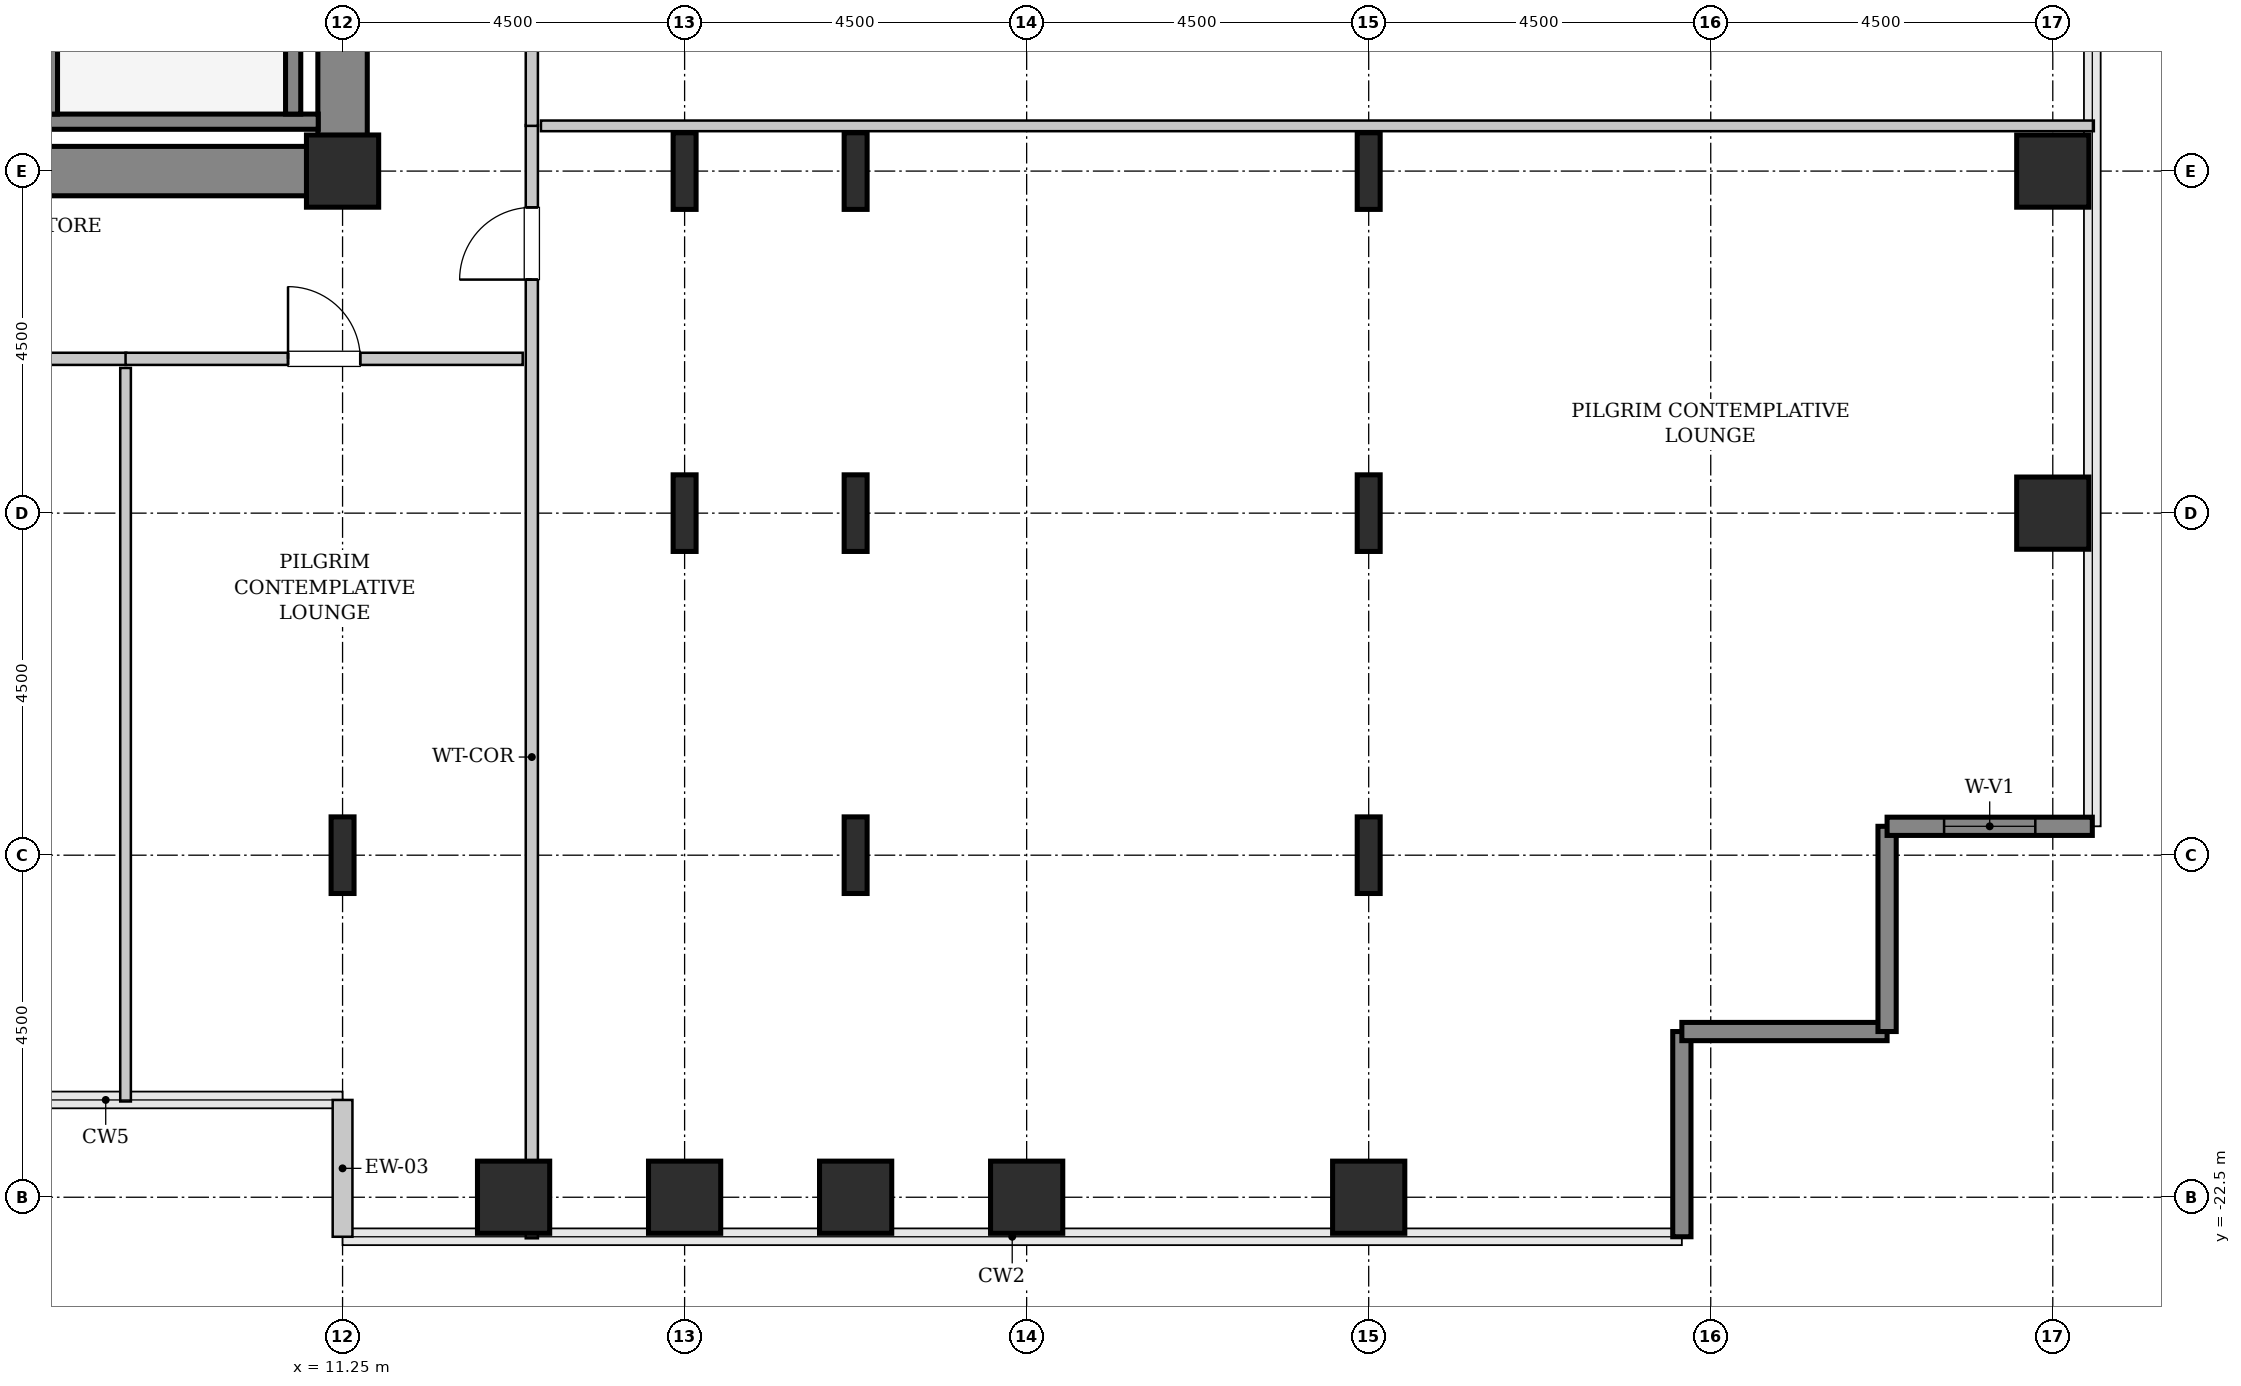
"""IFC4 building model, lengths in metres.
Left out: names, types, materials, properties, quantities, classifications, styles, units other than length and angle.
Written with IfcOpenShell. Run it as: python <this file> out.ifc"""

import sys

from ifc_helpers import new_model, si_unit, direction, frame, frame_2d, origin, origin_2d, place, context, subcontext, project, spatial, rectangle, hollow_rectangle, i_section, extrude, source, transform, mapped, element, fill, save


model = new_model("IFC4")
c1 = context("Model", 3, precision=1e-05, world=origin(), true_north=direction((0.0, 1.0)))
c2 = subcontext(c1, "Body", "Model", "MODEL_VIEW")
j1 = project(units=[si_unit("LENGTHUNIT", "METRE"), si_unit("PLANEANGLEUNIT", "RADIAN")], contexts=[c1])
p1 = place(None, origin())
s1 = spatial("IfcSite", under=j1, at=p1, CompositionType="ELEMENT")
p2 = place(p1, origin())
s2 = spatial("IfcBuilding", under=s1, at=p2, CompositionType="ELEMENT")
p3 = place(p2, frame((0.0, 0.0, 40.6)))
s3 = spatial("IfcBuildingStorey", under=s2, at=p3, CompositionType="ELEMENT", Elevation=40.6)
m1 = source(origin(), c2, "Body", "SweptSolid", [
    extrude(rectangle(XDim=10.025, YDim=0.65, at=frame_2d((5.012, 0.0))), origin(), (0.0, 0.0, 1.0), 3.8),
])
p4 = place(p3, frame((1.55, -9.0, 0.0), z_axis=(0.0, 0.0, 1.0), x_axis=(1.0, 0.0, 0.0)))
e1 = element("IfcWall", 1, at=p4, inside=s3, PredefinedType="SHEAR", context=c2, shape_type="MappedRepresentation", body=[
    mapped(m1, transform((0.0, 0.0, 0.0), x_axis=(1.0, 0.0, 0.0), y_axis=(0.0, 1.0, 0.0), z_axis=(0.0, 0.0, 1.0), scale=1.0)),
])
m2 = source(origin(), c2, "Body", "SweptSolid", [
    extrude(rectangle(XDim=7.325, YDim=0.65, at=frame_2d((3.663, 0.0))), origin(), (0.0, 0.0, 1.0), 3.8),
])
p5 = place(p3, frame((11.25, -8.675, 0.0), z_axis=(0.0, 0.0, 1.0), x_axis=(0.0, 1.0, 0.0)))
e2 = element("IfcWall", 2, at=p5, inside=s3, PredefinedType="SHEAR", context=c2, shape_type="MappedRepresentation", body=[
    mapped(m2, transform((0.0, 0.0, 0.0), x_axis=(1.0, 0.0, 0.0), y_axis=(0.0, 1.0, 0.0), z_axis=(0.0, 0.0, 1.0), scale=1.0)),
])
m3 = source(origin(), c2, "Body", "SweptSolid", [
    extrude(i_section(OverallWidth=0.302, OverallDepth=1.008, WebThickness=0.021, FlangeThickness=0.04, FilletRadius=0.03, at=origin_2d()), origin(), (0.0, 0.0, 1.0), 3.8),
])
p6 = place(p3, frame((11.25, -18.0, 0.0), z_axis=(0.0, 0.0, 1.0), x_axis=(1.0, 0.0, 0.0)))
e3 = element("IfcColumn", 3, at=p6, inside=s3, PredefinedType="COLUMN", context=c2, shape_type="MappedRepresentation", body=[
    mapped(m3, transform((0.0, 0.0, 0.0), x_axis=(1.0, 0.0, 0.0), y_axis=(0.0, 1.0, 0.0), z_axis=(0.0, 0.0, 1.0), scale=1.0)),
])
m4 = source(origin(), c2, "Body", "SweptSolid", [
    extrude(hollow_rectangle(XDim=0.95, YDim=0.95, WallThickness=0.045, InnerFilletRadius=0.045, OuterFilletRadius=0.09, at=origin_2d()), origin(), (0.0, 0.0, 1.0), 3.8),
])
p7 = place(p3, frame((11.25, -9.0, 0.0), z_axis=(0.0, 0.0, 1.0), x_axis=(1.0, 0.0, 0.0)))
e4 = element("IfcColumn", 4, at=p7, inside=s3, PredefinedType="COLUMN", context=c2, shape_type="MappedRepresentation", body=[
    mapped(m4, transform((0.0, 0.0, 0.0), x_axis=(1.0, 0.0, 0.0), y_axis=(0.0, 1.0, 0.0), z_axis=(0.0, 0.0, 1.0), scale=1.0)),
])
m5 = source(origin(), c2, "Body", "SweptSolid", [
    extrude(hollow_rectangle(XDim=0.95, YDim=0.95, WallThickness=0.045, InnerFilletRadius=0.045, OuterFilletRadius=0.09, at=origin_2d()), origin(), (0.0, 0.0, 1.0), 3.8),
])
for number, where, z_axis, x_axis in (
    (5, (13.5, -22.5, 0.0), (0.0, 0.0, 1.0), (1.0, 0.0, 0.0)),
    (6, (15.75, -22.5, 0.0), (0.0, 0.0, 1.0), (1.0, 0.0, 0.0)),
):
    element("IfcColumn", number, at=place(p3, frame(where, z_axis=z_axis, x_axis=x_axis)), inside=s3, PredefinedType="COLUMN", context=c2, shape_type="MappedRepresentation", body=[
        mapped(m5, transform((0.0, 0.0, 0.0), x_axis=(1.0, 0.0, 0.0), y_axis=(0.0, 1.0, 0.0), z_axis=(0.0, 0.0, 1.0), scale=1.0)),
    ])
for number, where, z_axis, x_axis in (
    (7, (15.75, -13.5, 0.0), (0.0, 0.0, 1.0), (1.0, 0.0, 0.0)),
    (8, (15.75, -9.0, 0.0), (0.0, 0.0, 1.0), (1.0, 0.0, 0.0)),
):
    element("IfcColumn", number, at=place(p3, frame(where, z_axis=z_axis, x_axis=x_axis)), inside=s3, PredefinedType="COLUMN", context=c2, shape_type="MappedRepresentation", body=[
        mapped(m3, transform((0.0, 0.0, 0.0), x_axis=(1.0, 0.0, 0.0), y_axis=(0.0, 1.0, 0.0), z_axis=(0.0, 0.0, 1.0), scale=1.0)),
    ])
p8 = place(p3, frame((18.0, -22.5, 0.0), z_axis=(0.0, 0.0, 1.0), x_axis=(1.0, 0.0, 0.0)))
e9 = element("IfcColumn", 9, at=p8, inside=s3, PredefinedType="COLUMN", context=c2, shape_type="MappedRepresentation", body=[
    mapped(m5, transform((0.0, 0.0, 0.0), x_axis=(1.0, 0.0, 0.0), y_axis=(0.0, 1.0, 0.0), z_axis=(0.0, 0.0, 1.0), scale=1.0)),
])
for number, where, z_axis, x_axis in (
    (10, (18.0, -18.0, 0.0), (0.0, 0.0, 1.0), (1.0, 0.0, 0.0)),
    (11, (18.0, -13.5, 0.0), (0.0, 0.0, 1.0), (1.0, 0.0, 0.0)),
    (12, (18.0, -9.0, 0.0), (0.0, 0.0, 1.0), (1.0, 0.0, 0.0)),
):
    element("IfcColumn", number, at=place(p3, frame(where, z_axis=z_axis, x_axis=x_axis)), inside=s3, PredefinedType="COLUMN", context=c2, shape_type="MappedRepresentation", body=[
        mapped(m3, transform((0.0, 0.0, 0.0), x_axis=(1.0, 0.0, 0.0), y_axis=(0.0, 1.0, 0.0), z_axis=(0.0, 0.0, 1.0), scale=1.0)),
    ])
for number, where, z_axis, x_axis in (
    (13, (20.25, -22.5, 0.0), (0.0, 0.0, 1.0), (1.0, 0.0, 0.0)),
    (14, (24.75, -22.5, 0.0), (0.0, 0.0, 1.0), (1.0, 0.0, 0.0)),
):
    element("IfcColumn", number, at=place(p3, frame(where, z_axis=z_axis, x_axis=x_axis)), inside=s3, PredefinedType="COLUMN", context=c2, shape_type="MappedRepresentation", body=[
        mapped(m5, transform((0.0, 0.0, 0.0), x_axis=(1.0, 0.0, 0.0), y_axis=(0.0, 1.0, 0.0), z_axis=(0.0, 0.0, 1.0), scale=1.0)),
    ])
for number, where, z_axis, x_axis in (
    (15, (24.75, -18.0, 0.0), (0.0, 0.0, 1.0), (1.0, 0.0, 0.0)),
    (16, (24.75, -13.5, 0.0), (0.0, 0.0, 1.0), (1.0, 0.0, 0.0)),
    (17, (24.75, -9.0, 0.0), (0.0, 0.0, 1.0), (1.0, 0.0, 0.0)),
):
    element("IfcColumn", number, at=place(p3, frame(where, z_axis=z_axis, x_axis=x_axis)), inside=s3, PredefinedType="COLUMN", context=c2, shape_type="MappedRepresentation", body=[
        mapped(m3, transform((0.0, 0.0, 0.0), x_axis=(1.0, 0.0, 0.0), y_axis=(0.0, 1.0, 0.0), z_axis=(0.0, 0.0, 1.0), scale=1.0)),
    ])
for number, where, z_axis, x_axis in (
    (18, (33.75, -13.5, 0.0), (0.0, 0.0, 1.0), (1.0, 0.0, 0.0)),
    (19, (33.75, -9.0, 0.0), (0.0, 0.0, 1.0), (1.0, 0.0, 0.0)),
):
    element("IfcColumn", number, at=place(p3, frame(where, z_axis=z_axis, x_axis=x_axis)), inside=s3, PredefinedType="COLUMN", context=c2, shape_type="MappedRepresentation", body=[
        mapped(m5, transform((0.0, 0.0, 0.0), x_axis=(1.0, 0.0, 0.0), y_axis=(0.0, 1.0, 0.0), z_axis=(0.0, 0.0, 1.0), scale=1.0)),
    ])
m6 = source(origin(), c2, "Body", "SweptSolid", [
    extrude(rectangle(XDim=1.8, YDim=0.26, at=frame_2d((0.9, 0.0))), origin(), (0.0, 0.0, 1.0), 3.55),
])
p9 = place(p3, frame((11.25, -21.22, 0.0), z_axis=(0.0, 0.0, 1.0), x_axis=(0.0, -1.0, 0.0)))
e20 = element("IfcWall", 20, at=p9, inside=s3, PredefinedType="SOLIDWALL", context=c2, shape_type="MappedRepresentation", body=[
    mapped(m6, transform((0.0, 0.0, 0.0), x_axis=(1.0, 0.0, 0.0), y_axis=(0.0, 1.0, 0.0), z_axis=(0.0, 0.0, 1.0), scale=1.0)),
])
m7 = source(origin(), c2, "Body", "SweptSolid", [
    extrude(rectangle(XDim=2.7, YDim=0.24, at=frame_2d((1.35, 0.0))), origin(), (0.0, 0.0, 1.0), 3.55),
])
for number, where, z_axis, x_axis in (
    (21, (28.87, -23.02, 0.0), (0.0, 0.0, 1.0), (0.0, 1.0, 0.0)),
    (22, (28.87, -20.32, 0.0), (0.0, 0.0, 1.0), (1.0, 0.0, 0.0)),
    (23, (31.57, -20.32, 0.0), (0.0, 0.0, 1.0), (0.0, 1.0, 0.0)),
):
    element("IfcWall", number, at=place(p3, frame(where, z_axis=z_axis, x_axis=x_axis)), inside=s3, PredefinedType="SHEAR", context=c2, shape_type="MappedRepresentation", body=[
        mapped(m7, transform((0.0, 0.0, 0.0), x_axis=(1.0, 0.0, 0.0), y_axis=(0.0, 1.0, 0.0), z_axis=(0.0, 0.0, 1.0), scale=1.0)),
    ])
p10 = place(p3, frame((31.57, -17.62, 0.0), z_axis=(0.0, 0.0, 1.0), x_axis=(1.0, 0.0, 0.0)))
e24 = element("IfcWall", 24, at=p10, inside=s3, PredefinedType="SHEAR", context=c2, shape_type="MappedRepresentation", body=[
    mapped(m7, transform((0.0, 0.0, 0.0), x_axis=(1.0, 0.0, 0.0), y_axis=(0.0, 1.0, 0.0), z_axis=(0.0, 0.0, 1.0), scale=1.0)),
])
p11 = place(p10, frame((0.75, 0.0, 0.85)))
e25 = element("IfcOpeningElement", 25, at=p11, cuts=e24, PredefinedType="OPENING", context=c2, shape_type="SweptSolid", body=[
    extrude(rectangle(XDim=1.2, YDim=1.8, at=frame_2d((0.6, 0.9))), frame((0.0, 0.13, 0.0), z_axis=(0.0, -1.0, 0.0), x_axis=(1.0, 0.0, 0.0)), (0.0, 0.0, 1.0), 0.26),
])
m8 = source(origin(), c2, "Body", "SweptSolid", [
    extrude(rectangle(XDim=3.63, YDim=0.2, at=frame_2d((1.815, 0.0))), origin(), (0.0, 0.0, 1.0), 3.8),
])
p12 = place(p3, frame((7.3, -8.35, 0.0), z_axis=(0.0, 0.0, 1.0), x_axis=(1.0, 0.0, 0.0)))
e26 = element("IfcWall", 26, at=p12, inside=s3, PredefinedType="SOLIDWALL", context=c2, shape_type="MappedRepresentation", body=[
    mapped(m8, transform((0.0, 0.0, 0.0), x_axis=(1.0, 0.0, 0.0), y_axis=(0.0, 1.0, 0.0), z_axis=(0.0, 0.0, 1.0), scale=1.0)),
])
m9 = source(origin(), c2, "Body", "SweptSolid", [
    extrude(rectangle(XDim=7.1, YDim=0.2, at=frame_2d((3.55, 0.0))), origin(), (0.0, 0.0, 1.0), 3.8),
])
p13 = place(p3, frame((7.4, -1.15, 0.0), z_axis=(0.0, 0.0, 1.0), x_axis=(0.0, -1.0, 0.0)))
e27 = element("IfcWall", 27, at=p13, inside=s3, PredefinedType="SOLIDWALL", context=c2, shape_type="MappedRepresentation", body=[
    mapped(m9, transform((0.0, 0.0, 0.0), x_axis=(1.0, 0.0, 0.0), y_axis=(0.0, 1.0, 0.0), z_axis=(0.0, 0.0, 1.0), scale=1.0)),
])
p14 = place(p13, frame((0.18, 0.0, 0.0)))
e28 = element("IfcOpeningElement", 28, at=p14, cuts=e27, PredefinedType="OPENING", context=c2, shape_type="SweptSolid", body=[
    extrude(rectangle(XDim=1.1, YDim=2.15, at=frame_2d((0.55, 1.075))), frame((0.0, 0.11, 0.0), z_axis=(0.0, -1.0, 0.0), x_axis=(1.0, 0.0, 0.0)), (0.0, 0.0, 1.0), 0.22),
])
p15 = place(p3, frame((10.6, -1.15, 0.0), z_axis=(0.0, 0.0, 1.0), x_axis=(0.0, -1.0, 0.0)))
e29 = element("IfcWall", 29, at=p15, inside=s3, PredefinedType="SOLIDWALL", context=c2, shape_type="MappedRepresentation", body=[
    mapped(m9, transform((0.0, 0.0, 0.0), x_axis=(1.0, 0.0, 0.0), y_axis=(0.0, 1.0, 0.0), z_axis=(0.0, 0.0, 1.0), scale=1.0)),
])
m10 = source(origin(), c2, "Body", "SweptSolid", [
    extrude(rectangle(XDim=14.645, YDim=0.16, at=frame_2d((7.323, 0.0))), origin(), (0.0, 0.0, 1.0), 3.535),
])
p16 = place(p3, frame((13.74, -23.04, 0.0), z_axis=(0.0, 0.0, 1.0), x_axis=(0.0, 1.0, 0.0)))
e30 = element("IfcWall", 30, at=p16, inside=s3, PredefinedType="PARTITIONING", context=c2, shape_type="MappedRepresentation", body=[
    mapped(m10, transform((0.0, 0.0, 0.0), x_axis=(1.0, 0.0, 0.0), y_axis=(0.0, 1.0, 0.0), z_axis=(0.0, 0.0, 1.0), scale=1.0)),
])
p17 = place(p16, frame((12.613, 0.0, 0.0)))
e31 = element("IfcOpeningElement", 31, at=p17, cuts=e30, PredefinedType="OPENING", context=c2, shape_type="SweptSolid", body=[
    extrude(rectangle(XDim=0.95, YDim=2.1, at=frame_2d((0.475, 1.05))), frame((0.0, 0.09, 0.0), z_axis=(0.0, -1.0, 0.0), x_axis=(1.0, 0.0, 0.0)), (0.0, 0.0, 1.0), 0.18),
])
m11 = source(origin(), c2, "Body", "SweptSolid", [
    extrude(rectangle(XDim=20.43, YDim=0.14, at=frame_2d((10.215, 0.0))), origin(), (0.0, 0.0, 1.0), 3.535),
])
p18 = place(p3, frame((13.86, -8.405, 0.0), z_axis=(0.0, 0.0, 1.0), x_axis=(1.0, 0.0, 0.0)))
e32 = element("IfcWall", 32, at=p18, inside=s3, PredefinedType="PARTITIONING", context=c2, shape_type="MappedRepresentation", body=[
    mapped(m11, transform((0.0, 0.0, 0.0), x_axis=(1.0, 0.0, 0.0), y_axis=(0.0, 1.0, 0.0), z_axis=(0.0, 0.0, 1.0), scale=1.0)),
])
m12 = source(origin(), c2, "Body", "SweptSolid", [
    extrude(rectangle(XDim=3.61, YDim=0.16, at=frame_2d((1.805, 0.0))), origin(), (0.0, 0.0, 1.0), 3.535),
])
p19 = place(p3, frame((13.74, -8.405, 0.0), z_axis=(0.0, 0.0, 1.0), x_axis=(0.0, 1.0, 0.0)))
e33 = element("IfcWall", 33, at=p19, inside=s3, PredefinedType="PARTITIONING", context=c2, shape_type="MappedRepresentation", body=[
    mapped(m12, transform((0.0, 0.0, 0.0), x_axis=(1.0, 0.0, 0.0), y_axis=(0.0, 1.0, 0.0), z_axis=(0.0, 0.0, 1.0), scale=1.0)),
])
p20 = place(p19, frame((1.33, 0.0, 0.0)))
e34 = element("IfcOpeningElement", 34, at=p20, cuts=e33, PredefinedType="OPENING", context=c2, shape_type="SweptSolid", body=[
    extrude(rectangle(XDim=0.95, YDim=2.1, at=frame_2d((0.475, 1.05))), frame((0.0, 0.09, 0.0), z_axis=(0.0, -1.0, 0.0), x_axis=(1.0, 0.0, 0.0)), (0.0, 0.0, 1.0), 0.18),
])
m13 = source(origin(), c2, "Body", "SweptSolid", [
    extrude(rectangle(XDim=5.81, YDim=0.16, at=frame_2d((2.905, 0.0))), origin(), (0.0, 0.0, 1.0), 3.535),
])
p21 = place(p3, frame((2.595, -11.47, 0.0), z_axis=(0.0, 0.0, 1.0), x_axis=(1.0, 0.0, 0.0)))
e35 = element("IfcWall", 35, at=p21, inside=s3, PredefinedType="PARTITIONING", context=c2, shape_type="MappedRepresentation", body=[
    mapped(m13, transform((0.0, 0.0, 0.0), x_axis=(1.0, 0.0, 0.0), y_axis=(0.0, 1.0, 0.0), z_axis=(0.0, 0.0, 1.0), scale=1.0)),
])
p22 = place(p21, frame((2.43, 0.0, 0.0)))
e36 = element("IfcOpeningElement", 36, at=p22, cuts=e35, PredefinedType="OPENING", context=c2, shape_type="SweptSolid", body=[
    extrude(rectangle(XDim=0.95, YDim=2.1, at=frame_2d((0.475, 1.05))), frame((0.0, 0.09, 0.0), z_axis=(0.0, -1.0, 0.0), x_axis=(1.0, 0.0, 0.0)), (0.0, 0.0, 1.0), 0.18),
])
m14 = source(origin(), c2, "Body", "SweptSolid", [
    extrude(rectangle(XDim=9.65, YDim=0.14, at=frame_2d((4.825, 0.0))), origin(), (0.0, 0.0, 1.0), 3.535),
])
p23 = place(p3, frame((8.395, -21.24, 0.0), z_axis=(0.0, 0.0, 1.0), x_axis=(0.0, 1.0, 0.0)))
e37 = element("IfcWall", 37, at=p23, inside=s3, PredefinedType="PARTITIONING", context=c2, shape_type="MappedRepresentation", body=[
    mapped(m14, transform((0.0, 0.0, 0.0), x_axis=(1.0, 0.0, 0.0), y_axis=(0.0, 1.0, 0.0), z_axis=(0.0, 0.0, 1.0), scale=1.0)),
])
m15 = source(origin(), c2, "Body", "SweptSolid", [
    extrude(rectangle(XDim=5.225, YDim=0.16, at=frame_2d((2.613, 0.0))), origin(), (0.0, 0.0, 1.0), 3.535),
])
p24 = place(p3, frame((8.395, -11.47, 0.0), z_axis=(0.0, 0.0, 1.0), x_axis=(1.0, 0.0, 0.0)))
e38 = element("IfcWall", 38, at=p24, inside=s3, PredefinedType="PARTITIONING", context=c2, shape_type="MappedRepresentation", body=[
    mapped(m15, transform((0.0, 0.0, 0.0), x_axis=(1.0, 0.0, 0.0), y_axis=(0.0, 1.0, 0.0), z_axis=(0.0, 0.0, 1.0), scale=1.0)),
])
p25 = place(p24, frame((2.137, 0.0, 0.0)))
e39 = element("IfcOpeningElement", 39, at=p25, cuts=e38, PredefinedType="OPENING", context=c2, shape_type="SweptSolid", body=[
    extrude(rectangle(XDim=0.95, YDim=2.1, at=frame_2d((0.475, 1.05))), frame((0.0, 0.09, 0.0), z_axis=(0.0, -1.0, 0.0), x_axis=(1.0, 0.0, 0.0)), (0.0, 0.0, 1.0), 0.18),
])
m16 = source(origin(), c2, "Body", "SweptSolid", [
    extrude(rectangle(XDim=1.2, YDim=1.8, at=frame_2d((0.6, 0.9))), frame((0.0, 0.03, 0.0), z_axis=(0.0, -1.0, 0.0), x_axis=(1.0, 0.0, 0.0)), (0.0, 0.0, 1.0), 0.06),
])
p26 = place(p11, origin())
e40 = element("IfcWindow", 40, at=p26, inside=s3, PartitioningType="SINGLE_PANEL", PredefinedType="WINDOW", context=c2, shape_type="MappedRepresentation", body=[
    mapped(m16, transform((0.0, 0.0, 0.0), x_axis=(1.0, 0.0, 0.0), y_axis=(0.0, 1.0, 0.0), z_axis=(0.0, 0.0, 1.0), scale=1.0)),
])
fill(e25, e40)
m17 = source(origin(), c2, "Body", "SweptSolid", [
    extrude(rectangle(XDim=0.95, YDim=2.1, at=frame_2d((0.475, 1.05))), frame((0.0, 0.025, 0.0), z_axis=(0.0, -1.0, 0.0), x_axis=(1.0, 0.0, 0.0)), (0.0, 0.0, 1.0), 0.05),
])
p27 = place(p17, origin())
e41 = element("IfcDoor", 41, at=p27, inside=s3, OperationType="SINGLE_SWING_LEFT", PredefinedType="DOOR", context=c2, shape_type="MappedRepresentation", body=[
    mapped(m17, transform((0.0, 0.0, 0.0), x_axis=(1.0, 0.0, 0.0), y_axis=(0.0, 1.0, 0.0), z_axis=(0.0, 0.0, 1.0), scale=1.0)),
])
fill(e31, e41)
p28 = place(p25, origin())
e42 = element("IfcDoor", 42, at=p28, inside=s3, OperationType="SINGLE_SWING_LEFT", PredefinedType="DOOR", context=c2, shape_type="MappedRepresentation", body=[
    mapped(m17, transform((0.0, 0.0, 0.0), x_axis=(1.0, 0.0, 0.0), y_axis=(0.0, 1.0, 0.0), z_axis=(0.0, 0.0, 1.0), scale=1.0)),
])
fill(e39, e42)
save(model, sys.argv[1])
